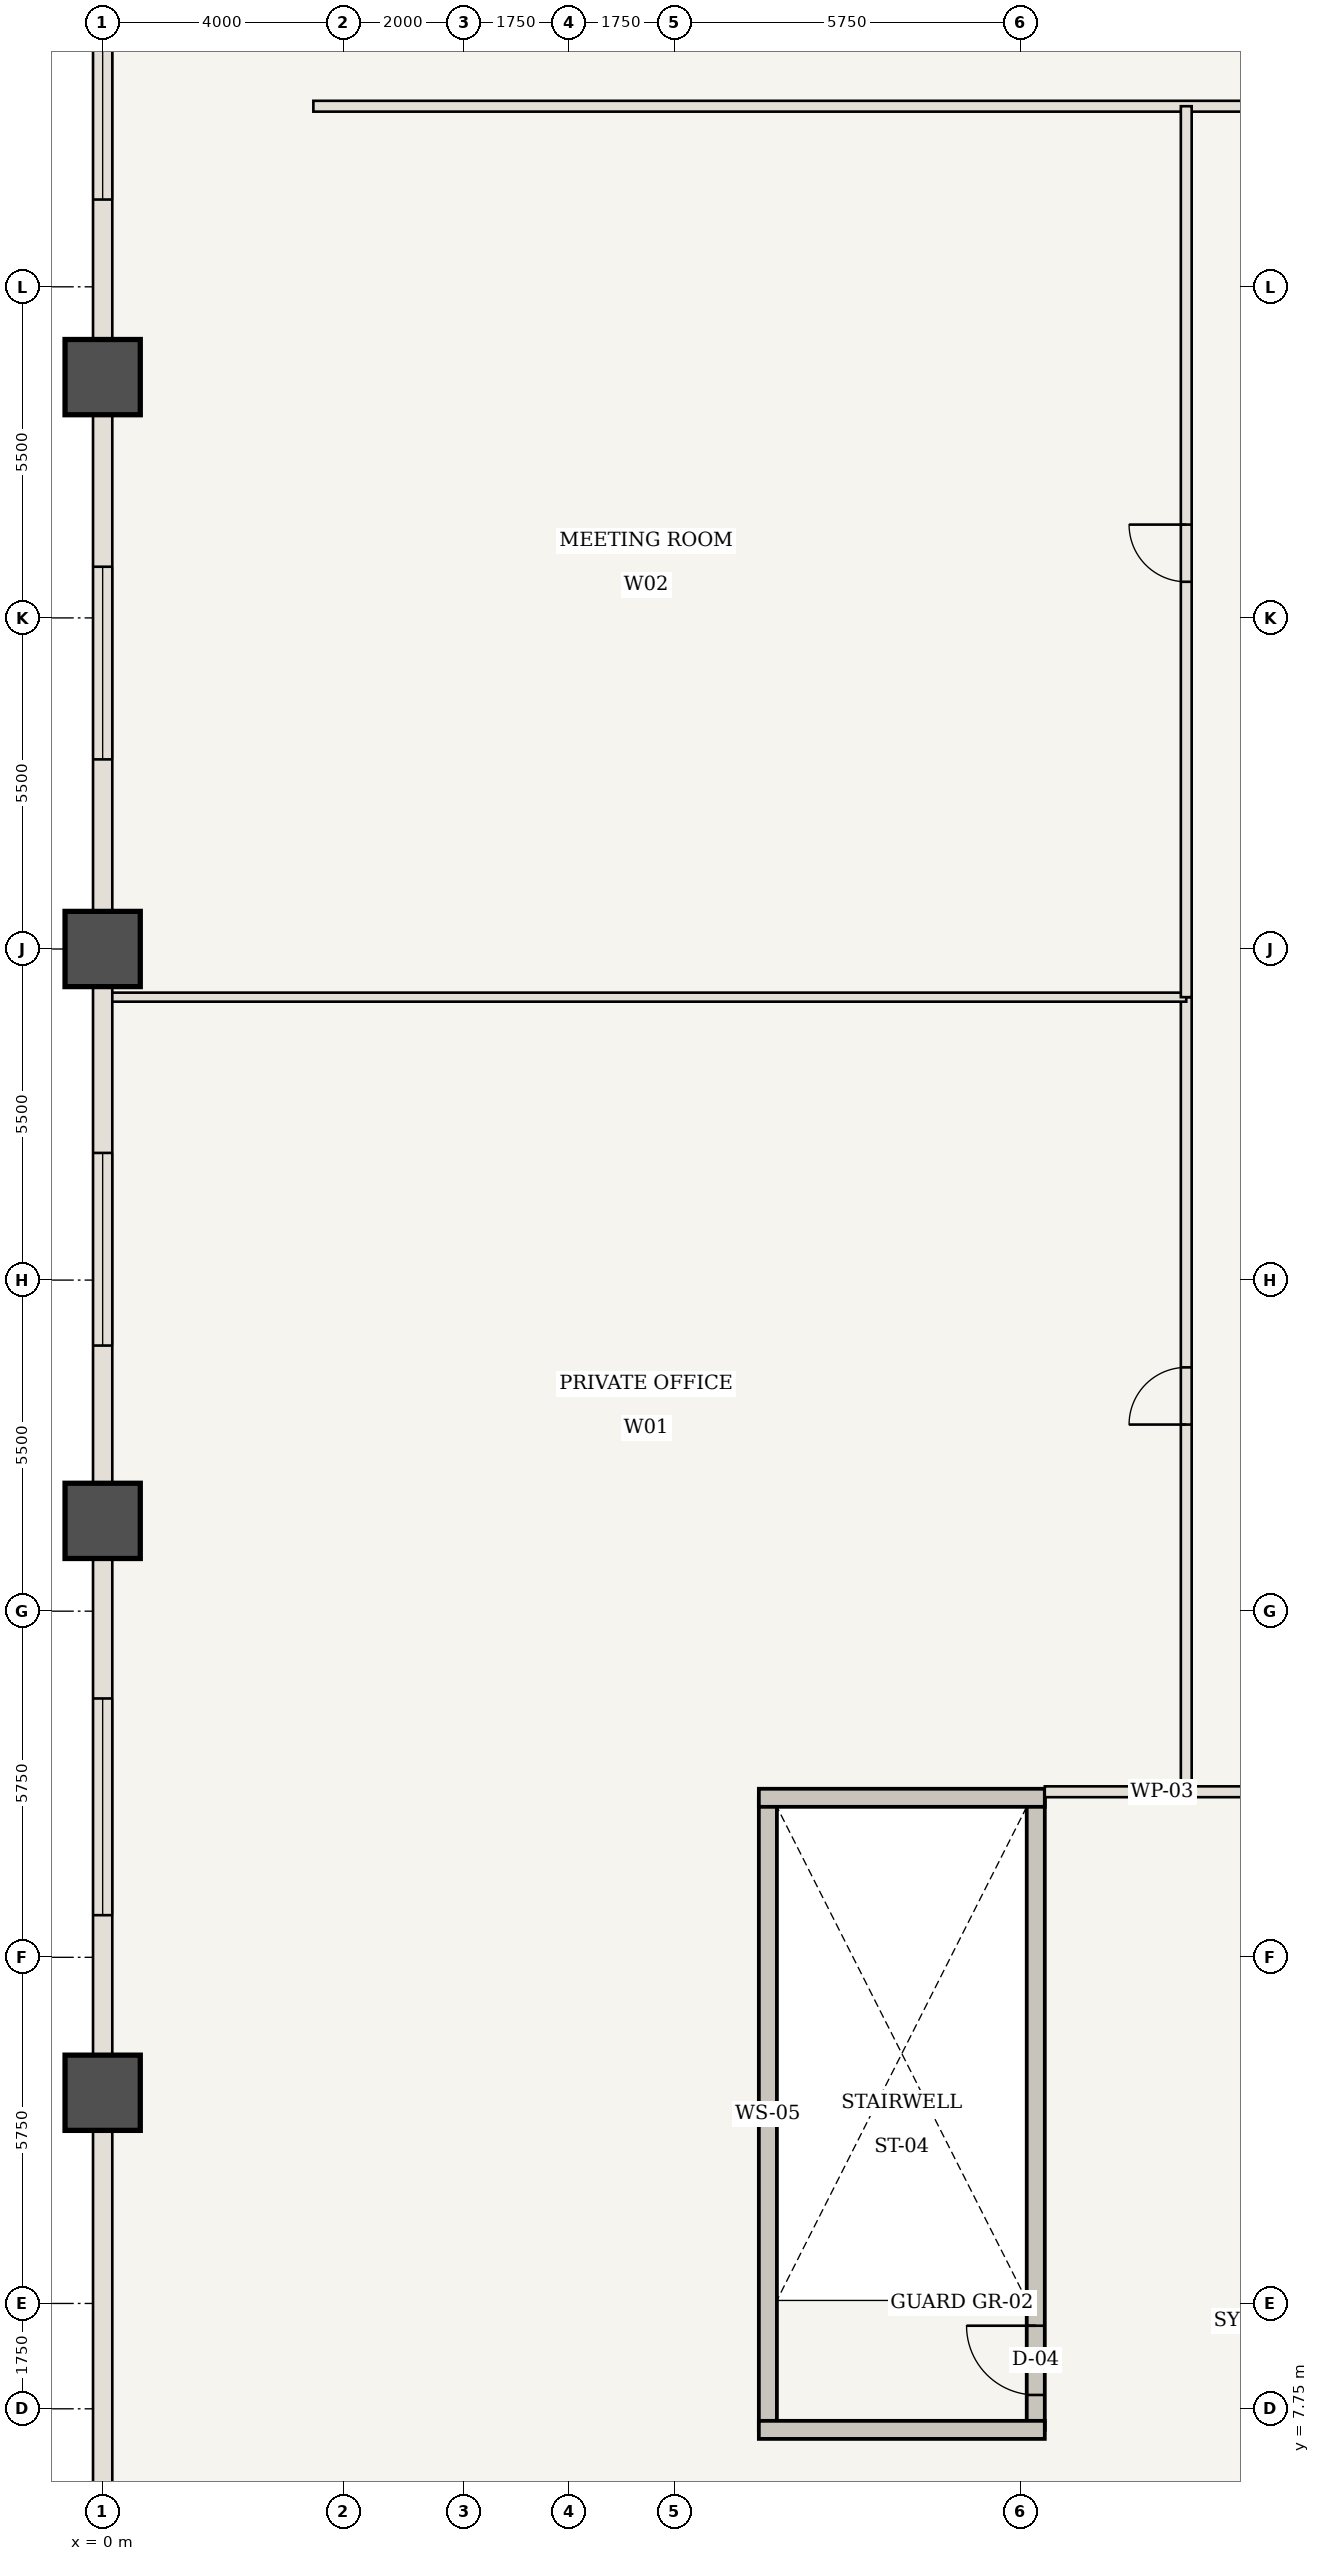
"""IFC4 building model, lengths in metres.
Left out: names, types, materials, properties, quantities, classifications, styles, units other than length and angle.
Written with IfcOpenShell. Run it as: python <this file> out.ifc"""

import sys

from ifc_helpers import new_model, si_unit, direction, frame, frame_2d, origin, origin_2d, place, context, subcontext, project, spatial, rectangle, extrude, element, fill, save


model = new_model("IFC4")
c1 = context("Model", 3, precision=1e-05, world=origin(), true_north=direction((0.0, 1.0)))
c2 = subcontext(c1, "Body", "Model", "MODEL_VIEW")
j1 = project(units=[si_unit("LENGTHUNIT", "METRE"), si_unit("PLANEANGLEUNIT", "RADIAN")], contexts=[c1])
p1 = place(None, origin())
s1 = spatial("IfcSite", under=j1, at=p1, CompositionType="ELEMENT")
p2 = place(p1, origin())
s2 = spatial("IfcBuilding", under=s1, at=p2, CompositionType="ELEMENT")
p3 = place(p2, frame((0.0, 0.0, 29.4)))
s3 = spatial("IfcBuildingStorey", under=s2, at=p3, CompositionType="ELEMENT", Elevation=29.4)
for number, where, z_axis, x_axis in (
    (1, (0.0, 13.0, 0.0), (0.0, 0.0, 1.0), (1.0, 0.0, 0.0)),
    (2, (0.0, 22.5, 0.0), (0.0, 0.0, 1.0), (1.0, 0.0, 0.0)),
    (3, (0.0, 32.0, 0.0), (0.0, 0.0, 1.0), (1.0, 0.0, 0.0)),
    (4, (0.0, 41.5, 0.0), (0.0, 0.0, 1.0), (1.0, 0.0, 0.0)),
):
    element("IfcColumn", number, at=place(p3, frame(where, z_axis=z_axis, x_axis=x_axis)), inside=s3, PredefinedType="COLUMN", context=c2, shape_type="SweptSolid", body=[
        extrude(rectangle(XDim=1.25, YDim=1.25, at=origin_2d()), origin(), (0.0, 0.0, 1.0), 4.48),
    ])
p4 = place(p3, frame((11.05, 7.4, 0.0), z_axis=(0.0, 0.0, 1.0), x_axis=(0.0, 1.0, 0.0)))
e5 = element("IfcWall", 5, at=p4, inside=s3, PredefinedType="SHEAR", context=c2, shape_type="SweptSolid", body=[
    extrude(rectangle(XDim=10.5, YDim=0.3, at=frame_2d((5.25, 0.0))), origin(), (0.0, 0.0, 1.0), 4.48),
])
p5 = place(p3, frame((15.5, 7.4, 0.0), z_axis=(0.0, 0.0, 1.0), x_axis=(0.0, 1.0, 0.0)))
e6 = element("IfcWall", 6, at=p5, inside=s3, PredefinedType="SHEAR", context=c2, shape_type="SweptSolid", body=[
    extrude(rectangle(XDim=10.5, YDim=0.3, at=frame_2d((5.25, 0.0))), origin(), (0.0, 0.0, 1.0), 4.48),
])
p6 = place(p5, frame((0.58, 0.0, 0.0)))
e7 = element("IfcOpeningElement", 7, at=p6, cuts=e6, PredefinedType="OPENING", context=c2, shape_type="SweptSolid", body=[
    extrude(rectangle(XDim=1.15, YDim=2.15, at=frame_2d((0.575, 1.075))), frame((0.0, 0.16, 0.0), z_axis=(0.0, -1.0, 0.0), x_axis=(1.0, 0.0, 0.0)), (0.0, 0.0, 1.0), 0.32),
])
for number, where, z_axis, x_axis in (
    (8, (10.9, 7.4, 0.0), (0.0, 0.0, 1.0), (1.0, 0.0, 0.0)),
    (9, (10.9, 17.9, 0.0), (0.0, 0.0, 1.0), (1.0, 0.0, 0.0)),
):
    element("IfcWall", number, at=place(p3, frame(where, z_axis=z_axis, x_axis=x_axis)), inside=s3, PredefinedType="SHEAR", context=c2, shape_type="SweptSolid", body=[
        extrude(rectangle(XDim=4.75, YDim=0.3, at=frame_2d((2.375, 0.0))), origin(), (0.0, 0.0, 1.0), 4.48),
    ])
p7 = place(p3, frame((15.65, 18.0, 0.0), z_axis=(0.0, 0.0, 1.0), x_axis=(1.0, 0.0, 0.0)))
e10 = element("IfcWall", 10, at=p7, inside=s3, PredefinedType="STANDARD", context=c2, shape_type="SweptSolid", body=[
    extrude(rectangle(XDim=8.85, YDim=0.18, at=frame_2d((4.425, 0.0))), origin(), (0.0, 0.0, 1.0), 4.48),
])
p8 = place(p7, frame((3.675, 0.0, 0.0)))
e11 = element("IfcOpeningElement", 11, at=p8, cuts=e10, PredefinedType="OPENING", context=c2, shape_type="SweptSolid", body=[
    extrude(rectangle(XDim=1.8, YDim=2.35, at=frame_2d((0.9, 1.175))), frame((0.0, 0.1, 0.0), z_axis=(0.0, -1.0, 0.0), x_axis=(1.0, 0.0, 0.0)), (0.0, 0.0, 1.0), 0.2),
])
p9 = place(p3, frame((3.5, 46.0, 0.0), z_axis=(0.0, 0.0, 1.0), x_axis=(1.0, 0.0, 0.0)))
e12 = element("IfcWall", 12, at=p9, inside=s3, PredefinedType="STANDARD", context=c2, shape_type="SweptSolid", body=[
    extrude(rectangle(XDim=19.5, YDim=0.18, at=frame_2d((9.75, 0.0))), origin(), (0.0, 0.0, 1.0), 4.48),
])
p10 = place(p9, frame((16.525, 0.0, 0.0)))
e13 = element("IfcOpeningElement", 13, at=p10, cuts=e12, PredefinedType="OPENING", context=c2, shape_type="SweptSolid", body=[
    extrude(rectangle(XDim=0.95, YDim=2.15, at=frame_2d((0.475, 1.075))), frame((0.0, 0.1, 0.0), z_axis=(0.0, -1.0, 0.0), x_axis=(1.0, 0.0, 0.0)), (0.0, 0.0, 1.0), 0.2),
])
p11 = place(p3, frame((18.0, 18.0, 0.0), z_axis=(0.0, 0.0, 1.0), x_axis=(0.0, 1.0, 0.0)))
e14 = element("IfcWall", 14, at=p11, inside=s3, PredefinedType="STANDARD", context=c2, shape_type="SweptSolid", body=[
    extrude(rectangle(XDim=13.2, YDim=0.18, at=frame_2d((6.6, 0.0))), origin(), (0.0, 0.0, 1.0), 4.48),
])
p12 = place(p11, frame((6.1, 0.0, 0.0)))
e15 = element("IfcOpeningElement", 15, at=p12, cuts=e14, PredefinedType="OPENING", context=c2, shape_type="SweptSolid", body=[
    extrude(rectangle(XDim=0.95, YDim=2.15, at=frame_2d((0.475, 1.075))), frame((0.0, 0.1, 0.0), z_axis=(0.0, -1.0, 0.0), x_axis=(1.0, 0.0, 0.0)), (0.0, 0.0, 1.0), 0.2),
])
p13 = place(p3, frame((0.06, 31.2, 0.0), z_axis=(0.0, 0.0, 1.0), x_axis=(1.0, 0.0, 0.0)))
e16 = element("IfcWall", 16, at=p13, inside=s3, PredefinedType="STANDARD", context=c2, shape_type="SweptSolid", body=[
    extrude(rectangle(XDim=17.94, YDim=0.15, at=frame_2d((8.97, 0.0))), origin(), (0.0, 0.0, 1.0), 2.508),
])
p14 = place(p3, frame((18.0, 31.2, 0.0), z_axis=(0.0, 0.0, 1.0), x_axis=(0.0, 1.0, 0.0)))
e17 = element("IfcWall", 17, at=p14, inside=s3, PredefinedType="STANDARD", context=c2, shape_type="SweptSolid", body=[
    extrude(rectangle(XDim=14.8, YDim=0.18, at=frame_2d((7.4, 0.0))), origin(), (0.0, 0.0, 1.0), 4.48),
])
p15 = place(p14, frame((6.9, 0.0, 0.0)))
e18 = element("IfcOpeningElement", 18, at=p15, cuts=e17, PredefinedType="OPENING", context=c2, shape_type="SweptSolid", body=[
    extrude(rectangle(XDim=0.95, YDim=2.15, at=frame_2d((0.475, 1.075))), frame((0.0, 0.1, 0.0), z_axis=(0.0, -1.0, 0.0), x_axis=(1.0, 0.0, 0.0)), (0.0, 0.0, 1.0), 0.2),
])
p16 = place(p3, frame((0.0, 3.5, 0.0), z_axis=(0.0, 0.0, 1.0), x_axis=(0.0, 1.0, 0.0)))
e19 = element("IfcWall", 19, at=p16, inside=s3, PredefinedType="USERDEFINED", context=c2, shape_type="SweptSolid", body=[
    extrude(rectangle(XDim=9.5, YDim=0.32, at=frame_2d((4.75, 0.0))), origin(), (0.0, 0.0, 1.0), 2.48),
])
p17 = place(p3, frame((0.0, 13.0, 0.0), z_axis=(0.0, 0.0, 1.0), x_axis=(0.0, 1.0, 0.0)))
e20 = element("IfcWall", 20, at=p17, inside=s3, PredefinedType="USERDEFINED", context=c2, shape_type="SweptSolid", body=[
    extrude(rectangle(XDim=9.5, YDim=0.32, at=frame_2d((4.75, 0.0))), origin(), (0.0, 0.0, 1.0), 2.48),
])
p18 = place(p17, frame((2.95, 0.0, 0.85)))
e21 = element("IfcOpeningElement", 21, at=p18, cuts=e20, PredefinedType="OPENING", context=c2, shape_type="SweptSolid", body=[
    extrude(rectangle(XDim=3.6, YDim=1.43, at=frame_2d((1.8, 0.715))), frame((0.0, 0.17, 0.0), z_axis=(0.0, -1.0, 0.0), x_axis=(1.0, 0.0, 0.0)), (0.0, 0.0, 1.0), 0.34),
])
p19 = place(p3, frame((0.0, 22.5, 0.0), z_axis=(0.0, 0.0, 1.0), x_axis=(0.0, 1.0, 0.0)))
e22 = element("IfcWall", 22, at=p19, inside=s3, PredefinedType="USERDEFINED", context=c2, shape_type="SweptSolid", body=[
    extrude(rectangle(XDim=9.5, YDim=0.32, at=frame_2d((4.75, 0.0))), origin(), (0.0, 0.0, 1.0), 2.48),
])
p20 = place(p19, frame((2.913, 0.0, 0.85)))
e23 = element("IfcOpeningElement", 23, at=p20, cuts=e22, PredefinedType="OPENING", context=c2, shape_type="SweptSolid", body=[
    extrude(rectangle(XDim=3.2, YDim=1.43, at=frame_2d((1.6, 0.715))), frame((0.0, 0.17, 0.0), z_axis=(0.0, -1.0, 0.0), x_axis=(1.0, 0.0, 0.0)), (0.0, 0.0, 1.0), 0.34),
])
p21 = place(p3, frame((0.0, 32.0, 0.0), z_axis=(0.0, 0.0, 1.0), x_axis=(0.0, 1.0, 0.0)))
e24 = element("IfcWall", 24, at=p21, inside=s3, PredefinedType="USERDEFINED", context=c2, shape_type="SweptSolid", body=[
    extrude(rectangle(XDim=9.5, YDim=0.32, at=frame_2d((4.75, 0.0))), origin(), (0.0, 0.0, 1.0), 2.48),
])
p22 = place(p21, frame((3.15, 0.0, 0.85)))
e25 = element("IfcOpeningElement", 25, at=p22, cuts=e24, PredefinedType="OPENING", context=c2, shape_type="SweptSolid", body=[
    extrude(rectangle(XDim=3.2, YDim=1.43, at=frame_2d((1.6, 0.715))), frame((0.0, 0.17, 0.0), z_axis=(0.0, -1.0, 0.0), x_axis=(1.0, 0.0, 0.0)), (0.0, 0.0, 1.0), 0.34),
])
p23 = place(p3, frame((0.0, 41.5, 0.0), z_axis=(0.0, 0.0, 1.0), x_axis=(0.0, 1.0, 0.0)))
e26 = element("IfcWall", 26, at=p23, inside=s3, PredefinedType="USERDEFINED", context=c2, shape_type="SweptSolid", body=[
    extrude(rectangle(XDim=9.5, YDim=0.32, at=frame_2d((4.75, 0.0))), origin(), (0.0, 0.0, 1.0), 2.48),
])
p24 = place(p23, frame((2.95, 0.0, 0.85)))
e27 = element("IfcOpeningElement", 27, at=p24, cuts=e26, PredefinedType="OPENING", context=c2, shape_type="SweptSolid", body=[
    extrude(rectangle(XDim=3.6, YDim=1.43, at=frame_2d((1.8, 0.715))), frame((0.0, 0.17, 0.0), z_axis=(0.0, -1.0, 0.0), x_axis=(1.0, 0.0, 0.0)), (0.0, 0.0, 1.0), 0.34),
])
p25 = place(p6, origin())
e28 = element("IfcDoor", 28, at=p25, inside=s3, OperationType="SINGLE_SWING_RIGHT", PredefinedType="DOOR", context=c2, shape_type="SweptSolid", body=[
    extrude(rectangle(XDim=1.15, YDim=2.15, at=frame_2d((0.575, 1.075))), frame((0.0, 0.025, 0.0), z_axis=(0.0, -1.0, 0.0), x_axis=(1.0, 0.0, 0.0)), (0.0, 0.0, 1.0), 0.05),
])
fill(e7, e28)
p26 = place(p12, origin())
e29 = element("IfcDoor", 29, at=p26, inside=s3, OperationType="SINGLE_SWING_LEFT", PredefinedType="DOOR", context=c2, shape_type="SweptSolid", body=[
    extrude(rectangle(XDim=0.95, YDim=2.15, at=frame_2d((0.475, 1.075))), frame((0.0, 0.025, 0.0), z_axis=(0.0, -1.0, 0.0), x_axis=(1.0, 0.0, 0.0)), (0.0, 0.0, 1.0), 0.05),
])
fill(e15, e29)
p27 = place(p15, origin())
e30 = element("IfcDoor", 30, at=p27, inside=s3, OperationType="SINGLE_SWING_RIGHT", PredefinedType="DOOR", context=c2, shape_type="SweptSolid", body=[
    extrude(rectangle(XDim=0.95, YDim=2.15, at=frame_2d((0.475, 1.075))), frame((0.0, 0.025, 0.0), z_axis=(0.0, -1.0, 0.0), x_axis=(1.0, 0.0, 0.0)), (0.0, 0.0, 1.0), 0.05),
])
fill(e18, e30)
p28 = place(p18, origin())
e31 = element("IfcWindow", 31, at=p28, inside=s3, PartitioningType="SINGLE_PANEL", PredefinedType="WINDOW", context=c2, shape_type="SweptSolid", body=[
    extrude(rectangle(XDim=3.6, YDim=1.43, at=frame_2d((1.8, 0.715))), frame((0.0, 0.03, 0.0), z_axis=(0.0, -1.0, 0.0), x_axis=(1.0, 0.0, 0.0)), (0.0, 0.0, 1.0), 0.06),
])
fill(e21, e31)
p29 = place(p20, origin())
e32 = element("IfcWindow", 32, at=p29, inside=s3, PartitioningType="SINGLE_PANEL", PredefinedType="WINDOW", context=c2, shape_type="SweptSolid", body=[
    extrude(rectangle(XDim=3.2, YDim=1.43, at=frame_2d((1.6, 0.715))), frame((0.0, 0.03, 0.0), z_axis=(0.0, -1.0, 0.0), x_axis=(1.0, 0.0, 0.0)), (0.0, 0.0, 1.0), 0.06),
])
fill(e23, e32)
p30 = place(p22, origin())
e33 = element("IfcWindow", 33, at=p30, inside=s3, PartitioningType="SINGLE_PANEL", PredefinedType="WINDOW", context=c2, shape_type="SweptSolid", body=[
    extrude(rectangle(XDim=3.2, YDim=1.43, at=frame_2d((1.6, 0.715))), frame((0.0, 0.03, 0.0), z_axis=(0.0, -1.0, 0.0), x_axis=(1.0, 0.0, 0.0)), (0.0, 0.0, 1.0), 0.06),
])
fill(e25, e33)
p31 = place(p24, origin())
e34 = element("IfcWindow", 34, at=p31, inside=s3, PartitioningType="SINGLE_PANEL", PredefinedType="WINDOW", context=c2, shape_type="SweptSolid", body=[
    extrude(rectangle(XDim=3.6, YDim=1.43, at=frame_2d((1.8, 0.715))), frame((0.0, 0.03, 0.0), z_axis=(0.0, -1.0, 0.0), x_axis=(1.0, 0.0, 0.0)), (0.0, 0.0, 1.0), 0.06),
])
fill(e27, e34)
save(model, sys.argv[1])
